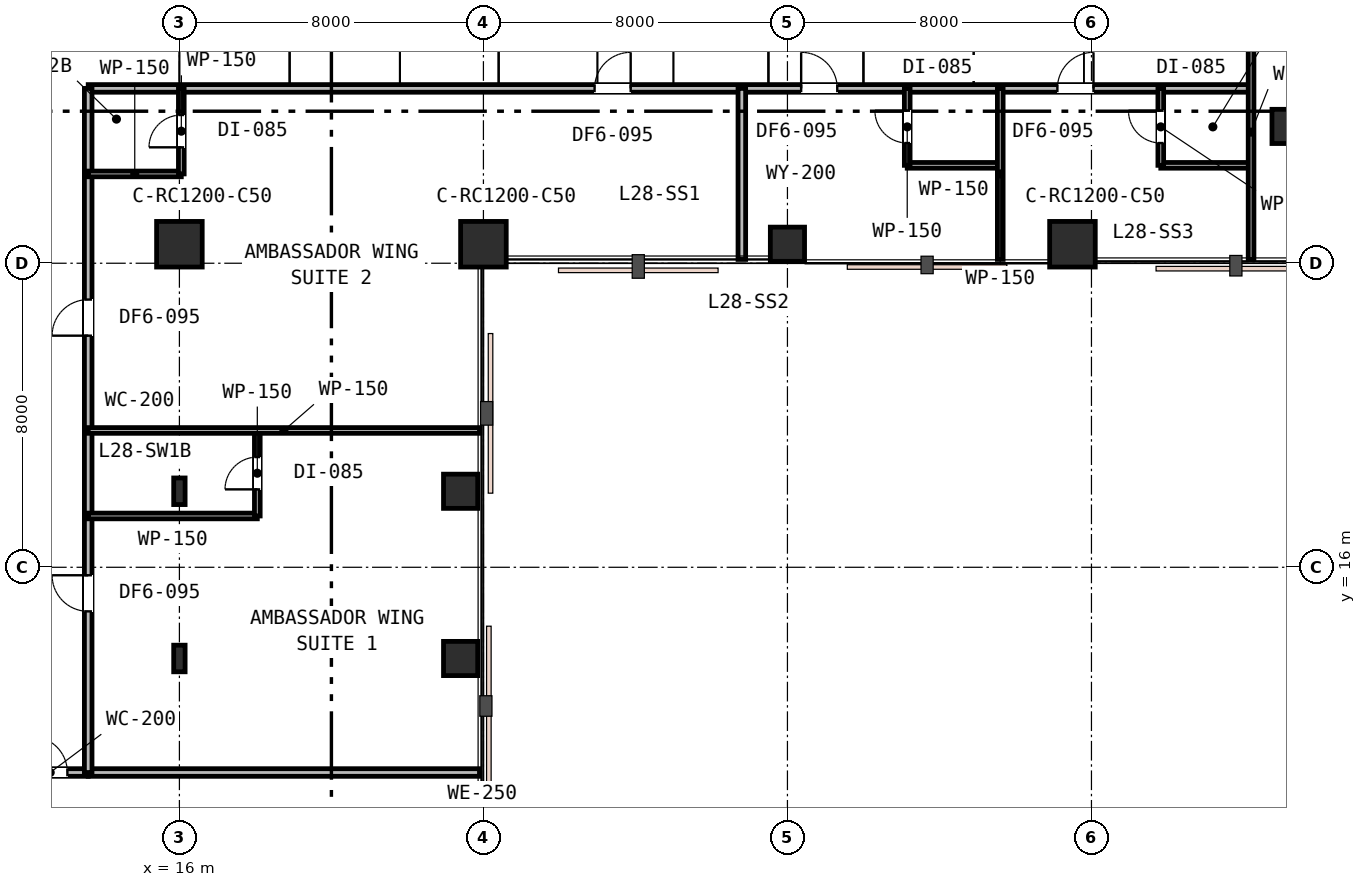
"""IFC4 building model, lengths in metres.
Left out: names, types, materials, properties, quantities, classifications, styles, units other than length and angle.
Written with IfcOpenShell. Run it as: python <this file> out.ifc"""

import sys

from ifc_helpers import new_model, si_unit, direction, frame, frame_2d, origin, origin_2d, place, context, subcontext, project, spatial, rectangle, i_section, extrude, element, fill, save


model = new_model("IFC4")
c1 = context("Model", 3, precision=1e-05, world=origin(), true_north=direction((0.0, 1.0)))
c2 = subcontext(c1, "Body", "Model", "MODEL_VIEW")
j1 = project(units=[si_unit("LENGTHUNIT", "METRE"), si_unit("PLANEANGLEUNIT", "RADIAN")], contexts=[c1])
p1 = place(None, origin())
s1 = spatial("IfcSite", under=j1, at=p1, CompositionType="ELEMENT")
p2 = place(p1, origin())
s2 = spatial("IfcBuilding", under=s1, at=p2, CompositionType="ELEMENT")
p3 = place(p2, frame((0.0, 0.0, 111.6)))
s3 = spatial("IfcBuildingStorey", under=s2, at=p3, CompositionType="ELEMENT", Elevation=111.6)
for number, where, z_axis, x_axis in (
    (1, (16.0, 24.5, 0.0), (0.0, 0.0, 1.0), (1.0, 0.0, 0.0)),
    (2, (24.0, 24.5, 0.0), (0.0, 0.0, 1.0), (1.0, 0.0, 0.0)),
):
    element("IfcColumn", number, at=place(p3, frame(where, z_axis=z_axis, x_axis=x_axis)), inside=s3, PredefinedType="COLUMN", context=c2, shape_type="SweptSolid", body=[
        extrude(rectangle(XDim=1.2, YDim=1.2, at=origin_2d()), origin(), (0.0, 0.0, 1.0), 3.6),
    ])
p4 = place(p3, frame((32.0, 24.5, 0.0), z_axis=(0.0, 0.0, 1.0), x_axis=(1.0, 0.0, 0.0)))
e3 = element("IfcColumn", 3, at=p4, inside=s3, PredefinedType="COLUMN", context=c2, shape_type="SweptSolid", body=[
    extrude(rectangle(XDim=0.9, YDim=0.9, at=origin_2d()), origin(), (0.0, 0.0, 1.0), 3.6),
])
p5 = place(p3, frame((39.5, 24.5, 0.0), z_axis=(0.0, 0.0, 1.0), x_axis=(1.0, 0.0, 0.0)))
e4 = element("IfcColumn", 4, at=p5, inside=s3, PredefinedType="COLUMN", context=c2, shape_type="SweptSolid", body=[
    extrude(rectangle(XDim=1.2, YDim=1.2, at=origin_2d()), origin(), (0.0, 0.0, 1.0), 3.6),
])
for number, where, z_axis, x_axis in (
    (5, (45.2, 27.6, 0.0), (0.0, 0.0, 1.0), (1.0, 0.0, 0.0)),
    (6, (23.4, 13.6, 0.0), (0.0, 0.0, 1.0), (1.0, 0.0, 0.0)),
    (7, (23.4, 18.0, 0.0), (0.0, 0.0, 1.0), (1.0, 0.0, 0.0)),
):
    element("IfcColumn", number, at=place(p3, frame(where, z_axis=z_axis, x_axis=x_axis)), inside=s3, PredefinedType="COLUMN", context=c2, shape_type="SweptSolid", body=[
        extrude(rectangle(XDim=0.9, YDim=0.9, at=origin_2d()), origin(), (0.0, 0.0, 1.0), 3.6),
    ])
for number, where, z_axis, x_axis in (
    (8, (16.0, 13.6, 0.0), (0.0, 0.0, 1.0), (1.0, 0.0, 0.0)),
    (9, (16.0, 18.0, 0.0), (0.0, 0.0, 1.0), (1.0, 0.0, 0.0)),
):
    element("IfcColumn", number, at=place(p3, frame(where, z_axis=z_axis, x_axis=x_axis)), inside=s3, PredefinedType="COLUMN", context=c2, shape_type="SweptSolid", body=[
        extrude(i_section(OverallWidth=0.3, OverallDepth=0.7, WebThickness=0.017, FlangeThickness=0.032, FilletRadius=0.027, at=origin_2d()), origin(), (0.0, 0.0, 1.0), 3.6),
    ])
p6 = place(p3, frame((13.6, 28.6, 0.0), z_axis=(0.0, 0.0, 1.0), x_axis=(1.0, 0.0, 0.0)))
e10 = element("IfcWall", 10, at=p6, inside=s3, PredefinedType="PARTITIONING", context=c2, shape_type="SweptSolid", body=[
    extrude(rectangle(XDim=30.6, YDim=0.2, at=frame_2d((15.3, 0.0))), origin(), (0.0, 0.0, 1.0), 2.87),
])
p7 = place(p6, frame((13.325, 0.0, 0.0)))
e11 = element("IfcOpeningElement", 11, at=p7, cuts=e10, PredefinedType="OPENING", context=c2, shape_type="SweptSolid", body=[
    extrude(rectangle(XDim=0.95, YDim=2.15, at=frame_2d((0.475, 1.075))), frame((0.0, 0.11, 0.0), z_axis=(0.0, -1.0, 0.0), x_axis=(1.0, 0.0, 0.0)), (0.0, 0.0, 1.0), 0.22),
])
p8 = place(p6, frame((18.761, 0.0, 0.0)))
e12 = element("IfcOpeningElement", 12, at=p8, cuts=e10, PredefinedType="OPENING", context=c2, shape_type="SweptSolid", body=[
    extrude(rectangle(XDim=0.95, YDim=2.15, at=frame_2d((0.475, 1.075))), frame((0.0, 0.11, 0.0), z_axis=(0.0, -1.0, 0.0), x_axis=(1.0, 0.0, 0.0)), (0.0, 0.0, 1.0), 0.22),
])
p9 = place(p6, frame((25.503, 0.0, 0.0)))
e13 = element("IfcOpeningElement", 13, at=p9, cuts=e10, PredefinedType="OPENING", context=c2, shape_type="SweptSolid", body=[
    extrude(rectangle(XDim=0.95, YDim=2.15, at=frame_2d((0.475, 1.075))), frame((0.0, 0.11, 0.0), z_axis=(0.0, -1.0, 0.0), x_axis=(1.0, 0.0, 0.0)), (0.0, 0.0, 1.0), 0.22),
])
p10 = place(p3, frame((13.6, 10.6, 0.0), z_axis=(0.0, 0.0, 1.0), x_axis=(1.0, 0.0, 0.0)))
e14 = element("IfcWall", 14, at=p10, inside=s3, PredefinedType="PARTITIONING", context=c2, shape_type="SweptSolid", body=[
    extrude(rectangle(XDim=10.3, YDim=0.2, at=frame_2d((5.15, 0.0))), origin(), (0.0, 0.0, 1.0), 2.87),
])
p11 = place(p3, frame((11.6, 10.6, 0.0), z_axis=(0.0, 0.0, 1.0), x_axis=(1.0, 0.0, 0.0)))
e15 = element("IfcWall", 15, at=p11, inside=s3, PredefinedType="PARTITIONING", context=c2, shape_type="SweptSolid", body=[
    extrude(rectangle(XDim=2.0, YDim=0.2, at=frame_2d((1.0, 0.0))), origin(), (0.0, 0.0, 1.0), 3.01),
])
p12 = place(p11, frame((0.502, 0.0, 0.0)))
e16 = element("IfcOpeningElement", 16, at=p12, cuts=e15, PredefinedType="OPENING", context=c2, shape_type="SweptSolid", body=[
    extrude(rectangle(XDim=0.95, YDim=2.15, at=frame_2d((0.475, 1.075))), frame((0.0, 0.11, 0.0), z_axis=(0.0, -1.0, 0.0), x_axis=(1.0, 0.0, 0.0)), (0.0, 0.0, 1.0), 0.22),
])
p13 = place(p3, frame((13.6, 10.6, 0.0), z_axis=(0.0, 0.0, 1.0), x_axis=(0.0, 1.0, 0.0)))
e17 = element("IfcWall", 17, at=p13, inside=s3, PredefinedType="PARTITIONING", context=c2, shape_type="SweptSolid", body=[
    extrude(rectangle(XDim=18.0, YDim=0.2, at=frame_2d((9.0, 0.0))), origin(), (0.0, 0.0, 1.0), 2.87),
])
p14 = place(p13, frame((4.24, 0.0, 0.0)))
e18 = element("IfcOpeningElement", 18, at=p14, cuts=e17, PredefinedType="OPENING", context=c2, shape_type="SweptSolid", body=[
    extrude(rectangle(XDim=0.95, YDim=2.15, at=frame_2d((0.475, 1.075))), frame((0.0, 0.11, 0.0), z_axis=(0.0, -1.0, 0.0), x_axis=(1.0, 0.0, 0.0)), (0.0, 0.0, 1.0), 0.22),
])
p15 = place(p13, frame((11.494, 0.0, 0.0)))
e19 = element("IfcOpeningElement", 19, at=p15, cuts=e17, PredefinedType="OPENING", context=c2, shape_type="SweptSolid", body=[
    extrude(rectangle(XDim=0.95, YDim=2.15, at=frame_2d((0.475, 1.075))), frame((0.0, 0.11, 0.0), z_axis=(0.0, -1.0, 0.0), x_axis=(1.0, 0.0, 0.0)), (0.0, 0.0, 1.0), 0.22),
])
p16 = place(p3, frame((13.6, 17.35, 0.0), z_axis=(0.0, 0.0, 1.0), x_axis=(1.0, 0.0, 0.0)))
e20 = element("IfcWall", 20, at=p16, inside=s3, PredefinedType="PARTITIONING", context=c2, shape_type="SweptSolid", body=[
    extrude(rectangle(XDim=4.45, YDim=0.15, at=frame_2d((2.225, 0.0))), origin(), (0.0, 0.0, 1.0), 2.87),
])
p17 = place(p3, frame((18.05, 17.35, 0.0), z_axis=(0.0, 0.0, 1.0), x_axis=(0.0, 1.0, 0.0)))
e21 = element("IfcWall", 21, at=p17, inside=s3, PredefinedType="PARTITIONING", context=c2, shape_type="SweptSolid", body=[
    extrude(rectangle(XDim=2.25, YDim=0.15, at=frame_2d((1.125, 0.0))), origin(), (0.0, 0.0, 1.0), 2.87),
])
p18 = place(p17, frame((0.7, 0.0, 0.0)))
e22 = element("IfcOpeningElement", 22, at=p18, cuts=e21, PredefinedType="OPENING", context=c2, shape_type="SweptSolid", body=[
    extrude(rectangle(XDim=0.85, YDim=2.15, at=frame_2d((0.425, 1.075))), frame((0.0, 0.085, 0.0), z_axis=(0.0, -1.0, 0.0), x_axis=(1.0, 0.0, 0.0)), (0.0, 0.0, 1.0), 0.17),
])
p19 = place(p3, frame((13.6, 19.6, 0.0), z_axis=(0.0, 0.0, 1.0), x_axis=(1.0, 0.0, 0.0)))
e23 = element("IfcWall", 23, at=p19, inside=s3, PredefinedType="PARTITIONING", context=c2, shape_type="SweptSolid", body=[
    extrude(rectangle(XDim=10.3, YDim=0.15, at=frame_2d((5.15, 0.0))), origin(), (0.0, 0.0, 1.0), 2.87),
])
p20 = place(p3, frame((13.6, 26.35, 0.0), z_axis=(0.0, 0.0, 1.0), x_axis=(1.0, 0.0, 0.0)))
e24 = element("IfcWall", 24, at=p20, inside=s3, PredefinedType="PARTITIONING", context=c2, shape_type="SweptSolid", body=[
    extrude(rectangle(XDim=2.45, YDim=0.15, at=frame_2d((1.225, 0.0))), origin(), (0.0, 0.0, 1.0), 2.87),
])
p21 = place(p3, frame((16.05, 26.35, 0.0), z_axis=(0.0, 0.0, 1.0), x_axis=(0.0, 1.0, 0.0)))
e25 = element("IfcWall", 25, at=p21, inside=s3, PredefinedType="PARTITIONING", context=c2, shape_type="SweptSolid", body=[
    extrude(rectangle(XDim=2.25, YDim=0.15, at=frame_2d((1.125, 0.0))), origin(), (0.0, 0.0, 1.0), 2.87),
])
p22 = place(p21, frame((0.7, 0.0, 0.0)))
e26 = element("IfcOpeningElement", 26, at=p22, cuts=e25, PredefinedType="OPENING", context=c2, shape_type="SweptSolid", body=[
    extrude(rectangle(XDim=0.85, YDim=2.15, at=frame_2d((0.425, 1.075))), frame((0.0, 0.085, 0.0), z_axis=(0.0, -1.0, 0.0), x_axis=(1.0, 0.0, 0.0)), (0.0, 0.0, 1.0), 0.17),
])
p23 = place(p3, frame((30.8, 24.1, 0.0), z_axis=(0.0, 0.0, 1.0), x_axis=(0.0, 1.0, 0.0)))
e27 = element("IfcWall", 27, at=p23, inside=s3, PredefinedType="PARTITIONING", context=c2, shape_type="SweptSolid", body=[
    extrude(rectangle(XDim=4.5, YDim=0.2, at=frame_2d((2.25, 0.0))), origin(), (0.0, 0.0, 1.0), 2.96),
])
p24 = place(p3, frame((35.152, 26.576, 0.0), z_axis=(0.0, 0.0, 1.0), x_axis=(1.0, 0.0, 0.0)))
e28 = element("IfcWall", 28, at=p24, inside=s3, PredefinedType="PARTITIONING", context=c2, shape_type="SweptSolid", body=[
    extrude(rectangle(XDim=2.448, YDim=0.15, at=frame_2d((1.224, 0.0))), origin(), (0.0, 0.0, 1.0), 3.01),
])
p25 = place(p3, frame((35.152, 26.576, 0.0), z_axis=(0.0, 0.0, 1.0), x_axis=(0.0, 1.0, 0.0)))
e29 = element("IfcWall", 29, at=p25, inside=s3, PredefinedType="PARTITIONING", context=c2, shape_type="SweptSolid", body=[
    extrude(rectangle(XDim=2.024, YDim=0.15, at=frame_2d((1.012, 0.0))), origin(), (0.0, 0.0, 1.0), 3.33),
])
p26 = place(p25, frame((0.587, 0.0, 0.0)))
e30 = element("IfcOpeningElement", 30, at=p26, cuts=e29, PredefinedType="OPENING", context=c2, shape_type="SweptSolid", body=[
    extrude(rectangle(XDim=0.85, YDim=2.15, at=frame_2d((0.425, 1.075))), frame((0.0, 0.085, 0.0), z_axis=(0.0, -1.0, 0.0), x_axis=(1.0, 0.0, 0.0)), (0.0, 0.0, 1.0), 0.17),
])
p27 = place(p3, frame((37.6, 28.6, 0.0), z_axis=(0.0, 0.0, 1.0), x_axis=(0.0, -1.0, 0.0)))
e31 = element("IfcWall", 31, at=p27, inside=s3, PredefinedType="PARTITIONING", context=c2, shape_type="SweptSolid", body=[
    extrude(rectangle(XDim=4.5, YDim=0.15, at=frame_2d((2.25, 0.0))), origin(), (0.0, 0.0, 1.0), 2.96),
])
p28 = place(p3, frame((41.824, 26.576, 0.0), z_axis=(0.0, 0.0, 1.0), x_axis=(1.0, 0.0, 0.0)))
e32 = element("IfcWall", 32, at=p28, inside=s3, PredefinedType="PARTITIONING", context=c2, shape_type="SweptSolid", body=[
    extrude(rectangle(XDim=2.376, YDim=0.15, at=frame_2d((1.188, 0.0))), origin(), (0.0, 0.0, 1.0), 3.33),
])
p29 = place(p3, frame((41.824, 26.576, 0.0), z_axis=(0.0, 0.0, 1.0), x_axis=(0.0, 1.0, 0.0)))
e33 = element("IfcWall", 33, at=p29, inside=s3, PredefinedType="PARTITIONING", context=c2, shape_type="SweptSolid", body=[
    extrude(rectangle(XDim=2.024, YDim=0.15, at=frame_2d((1.012, 0.0))), origin(), (0.0, 0.0, 1.0), 3.33),
])
p30 = place(p29, frame((0.587, 0.0, 0.0)))
e34 = element("IfcOpeningElement", 34, at=p30, cuts=e33, PredefinedType="OPENING", context=c2, shape_type="SweptSolid", body=[
    extrude(rectangle(XDim=0.85, YDim=2.15, at=frame_2d((0.425, 1.075))), frame((0.0, 0.085, 0.0), z_axis=(0.0, -1.0, 0.0), x_axis=(1.0, 0.0, 0.0)), (0.0, 0.0, 1.0), 0.17),
])
p31 = place(p3, frame((44.2, 30.8, 0.0), z_axis=(0.0, 0.0, 1.0), x_axis=(0.0, -1.0, 0.0)))
e35 = element("IfcWall", 35, at=p31, inside=s3, PredefinedType="PARTITIONING", context=c2, shape_type="SweptSolid", body=[
    extrude(rectangle(XDim=6.7, YDim=0.15, at=frame_2d((3.35, 0.0))), origin(), (0.0, 0.0, 1.0), 2.87),
])
p32 = place(p12, origin())
e36 = element("IfcDoor", 36, at=p32, inside=s3, OperationType="SINGLE_SWING_LEFT", PredefinedType="DOOR", context=c2, shape_type="SweptSolid", body=[
    extrude(rectangle(XDim=0.95, YDim=2.15, at=frame_2d((0.475, 1.075))), frame((0.0, 0.025, 0.0), z_axis=(0.0, -1.0, 0.0), x_axis=(1.0, 0.0, 0.0)), (0.0, 0.0, 1.0), 0.05),
])
fill(e16, e36)
p33 = place(p14, origin())
e37 = element("IfcDoor", 37, at=p33, inside=s3, OperationType="SINGLE_SWING_RIGHT", PredefinedType="DOOR", context=c2, shape_type="SweptSolid", body=[
    extrude(rectangle(XDim=0.95, YDim=2.15, at=frame_2d((0.475, 1.075))), frame((0.0, 0.025, 0.0), z_axis=(0.0, -1.0, 0.0), x_axis=(1.0, 0.0, 0.0)), (0.0, 0.0, 1.0), 0.05),
])
fill(e18, e37)
p34 = place(p18, origin())
e38 = element("IfcDoor", 38, at=p34, inside=s3, OperationType="SINGLE_SWING_LEFT", PredefinedType="DOOR", context=c2, shape_type="SweptSolid", body=[
    extrude(rectangle(XDim=0.85, YDim=2.15, at=frame_2d((0.425, 1.075))), frame((0.0, 0.025, 0.0), z_axis=(0.0, -1.0, 0.0), x_axis=(1.0, 0.0, 0.0)), (0.0, 0.0, 1.0), 0.05),
])
fill(e22, e38)
p35 = place(p15, origin())
e39 = element("IfcDoor", 39, at=p35, inside=s3, OperationType="SINGLE_SWING_LEFT", PredefinedType="DOOR", context=c2, shape_type="SweptSolid", body=[
    extrude(rectangle(XDim=0.95, YDim=2.15, at=frame_2d((0.475, 1.075))), frame((0.0, 0.025, 0.0), z_axis=(0.0, -1.0, 0.0), x_axis=(1.0, 0.0, 0.0)), (0.0, 0.0, 1.0), 0.05),
])
fill(e19, e39)
p36 = place(p22, origin())
e40 = element("IfcDoor", 40, at=p36, inside=s3, OperationType="SINGLE_SWING_LEFT", PredefinedType="DOOR", context=c2, shape_type="SweptSolid", body=[
    extrude(rectangle(XDim=0.85, YDim=2.15, at=frame_2d((0.425, 1.075))), frame((0.0, 0.025, 0.0), z_axis=(0.0, -1.0, 0.0), x_axis=(1.0, 0.0, 0.0)), (0.0, 0.0, 1.0), 0.05),
])
fill(e26, e40)
p37 = place(p7, origin())
e41 = element("IfcDoor", 41, at=p37, inside=s3, OperationType="SINGLE_SWING_RIGHT", PredefinedType="DOOR", context=c2, shape_type="SweptSolid", body=[
    extrude(rectangle(XDim=0.95, YDim=2.15, at=frame_2d((0.475, 1.075))), frame((0.0, 0.025, 0.0), z_axis=(0.0, -1.0, 0.0), x_axis=(1.0, 0.0, 0.0)), (0.0, 0.0, 1.0), 0.05),
])
fill(e11, e41)
p38 = place(p8, origin())
e42 = element("IfcDoor", 42, at=p38, inside=s3, OperationType="SINGLE_SWING_LEFT", PredefinedType="DOOR", context=c2, shape_type="SweptSolid", body=[
    extrude(rectangle(XDim=0.95, YDim=2.15, at=frame_2d((0.475, 1.075))), frame((0.0, 0.025, 0.0), z_axis=(0.0, -1.0, 0.0), x_axis=(1.0, 0.0, 0.0)), (0.0, 0.0, 1.0), 0.05),
])
fill(e12, e42)
p39 = place(p26, origin())
e43 = element("IfcDoor", 43, at=p39, inside=s3, OperationType="SINGLE_SWING_RIGHT", PredefinedType="DOOR", context=c2, shape_type="SweptSolid", body=[
    extrude(rectangle(XDim=0.85, YDim=2.15, at=frame_2d((0.425, 1.075))), frame((0.0, 0.025, 0.0), z_axis=(0.0, -1.0, 0.0), x_axis=(1.0, 0.0, 0.0)), (0.0, 0.0, 1.0), 0.05),
])
fill(e30, e43)
p40 = place(p9, origin())
e44 = element("IfcDoor", 44, at=p40, inside=s3, OperationType="SINGLE_SWING_RIGHT", PredefinedType="DOOR", context=c2, shape_type="SweptSolid", body=[
    extrude(rectangle(XDim=0.95, YDim=2.15, at=frame_2d((0.475, 1.075))), frame((0.0, 0.025, 0.0), z_axis=(0.0, -1.0, 0.0), x_axis=(1.0, 0.0, 0.0)), (0.0, 0.0, 1.0), 0.05),
])
fill(e13, e44)
p41 = place(p30, origin())
e45 = element("IfcDoor", 45, at=p41, inside=s3, OperationType="SINGLE_SWING_RIGHT", PredefinedType="DOOR", context=c2, shape_type="SweptSolid", body=[
    extrude(rectangle(XDim=0.85, YDim=2.15, at=frame_2d((0.425, 1.075))), frame((0.0, 0.025, 0.0), z_axis=(0.0, -1.0, 0.0), x_axis=(1.0, 0.0, 0.0)), (0.0, 0.0, 1.0), 0.05),
])
fill(e34, e45)
save(model, sys.argv[1])
